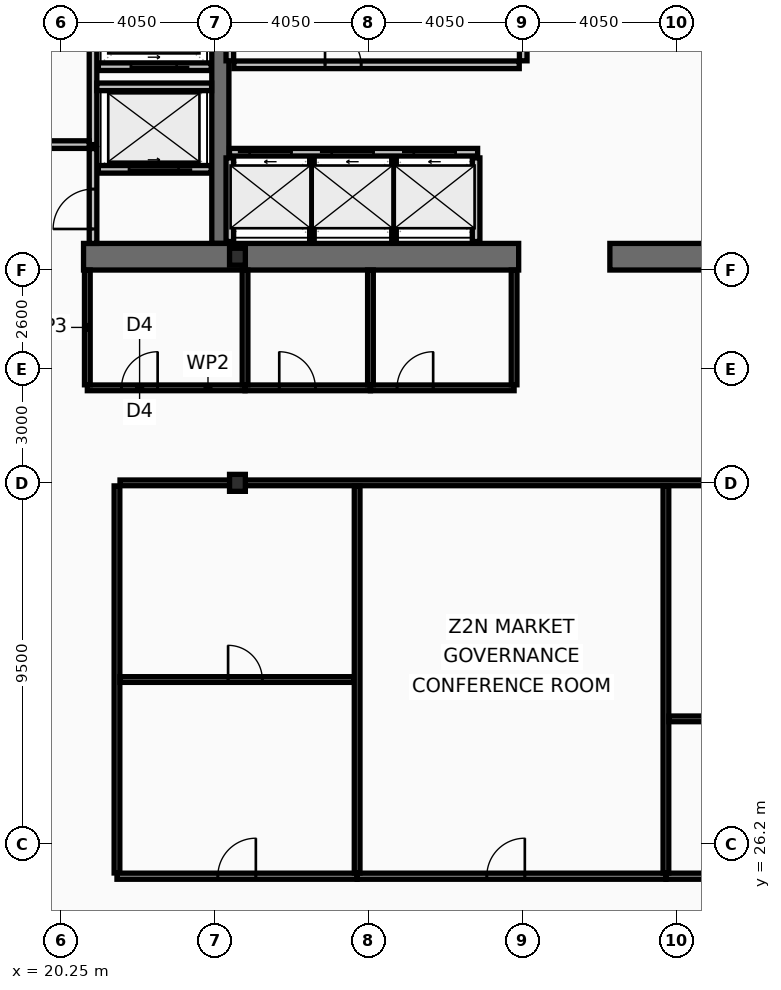
"""IFC4 building model, lengths in metres.
Left out: names, types, materials, properties, quantities, classifications, styles, units other than length and angle.
Written with IfcOpenShell. Run it as: python <this file> out.ifc"""

import sys

from ifc_helpers import new_model, si_unit, direction, frame, frame_2d, origin, origin_2d, place, context, subcontext, project, spatial, rectangle, i_section, extrude, element, fill, save


model = new_model("IFC4")
c1 = context("Model", 3, precision=1e-05, world=origin(), true_north=direction((0.0, 1.0)))
c2 = subcontext(c1, "Body", "Model", "MODEL_VIEW")
j1 = project(units=[si_unit("LENGTHUNIT", "METRE"), si_unit("PLANEANGLEUNIT", "RADIAN")], contexts=[c1])
p1 = place(None, origin())
s1 = spatial("IfcSite", under=j1, at=p1, CompositionType="ELEMENT")
p2 = place(p1, origin())
s2 = spatial("IfcBuilding", under=s1, at=p2, CompositionType="ELEMENT")
p3 = place(p2, frame((0.0, 0.0, 168.6)))
s3 = spatial("IfcBuildingStorey", under=s2, at=p3, CompositionType="ELEMENT", Elevation=168.6)
p4 = place(p3, frame((24.45, 42.0, 0.0), z_axis=(0.0, 0.0, 1.0), x_axis=(0.0, 1.0, 0.0)))
e1 = element("IfcWall", 1, at=p4, inside=s3, PredefinedType="SHEAR", context=c2, shape_type="SweptSolid", body=[
    extrude(rectangle(XDim=11.0, YDim=0.45, at=frame_2d((5.5, 0.0))), origin(), (0.0, 0.0, 1.0), 3.38),
])
p5 = place(p3, frame((32.3, 41.65, 0.0), z_axis=(0.0, 0.0, 1.0), x_axis=(-1.0, 0.0, 0.0)))
e2 = element("IfcWall", 2, at=p5, inside=s3, PredefinedType="SHEAR", context=c2, shape_type="SweptSolid", body=[
    extrude(rectangle(XDim=11.45, YDim=0.7, at=frame_2d((5.725, 0.0))), origin(), (0.0, 0.0, 1.0), 3.38),
])
p6 = place(p3, frame((38.45, 41.65, 0.0), z_axis=(0.0, 0.0, 1.0), x_axis=(-1.0, 0.0, 0.0)))
e3 = element("IfcWall", 3, at=p6, inside=s3, PredefinedType="SHEAR", context=c2, shape_type="SweptSolid", body=[
    extrude(rectangle(XDim=3.75, YDim=0.7, at=frame_2d((1.875, 0.0))), origin(), (0.0, 0.0, 1.0), 3.38),
])
for number, where, z_axis, x_axis in (
    (4, (24.9, 35.7, 0.0), (0.0, 0.0, 1.0), (1.0, 0.0, 0.0)),
    (5, (24.9, 41.65, 0.0), (0.0, 0.0, 1.0), (1.0, 0.0, 0.0)),
):
    element("IfcColumn", number, at=place(p3, frame(where, z_axis=z_axis, x_axis=x_axis)), inside=s3, PredefinedType="COLUMN", context=c2, shape_type="SweptSolid", body=[
        extrude(i_section(OverallWidth=0.416, OverallDepth=0.446, WebThickness=0.039, FlangeThickness=0.063, at=origin_2d()), origin(), (0.0, 0.0, 1.0), 3.6),
    ])
p7 = place(p3, frame((24.69, 44.4, 0.0), z_axis=(0.0, 0.0, 1.0), x_axis=(1.0, 0.0, 0.0)))
e6 = element("IfcWall", 6, at=p7, inside=s3, PredefinedType="PARTITIONING", context=c2, shape_type="SweptSolid", body=[
    extrude(rectangle(XDim=6.53, YDim=0.2, at=frame_2d((3.265, 0.0))), origin(), (0.0, 0.0, 1.0), 3.38),
])
p8 = place(p7, frame((0.53, 0.0, 0.0)))
e7 = element("IfcOpeningElement", 7, at=p8, cuts=e6, PredefinedType="OPENING", context=c2, shape_type="SweptSolid", body=[
    extrude(rectangle(XDim=1.1, YDim=2.18, at=frame_2d((0.55, 1.09))), frame((0.0, 0.11, 0.0), z_axis=(0.0, -1.0, 0.0), x_axis=(1.0, 0.0, 0.0)), (0.0, 0.0, 1.0), 0.22),
])
p9 = place(p7, frame((2.69, 0.0, 0.0)))
e8 = element("IfcOpeningElement", 8, at=p9, cuts=e6, PredefinedType="OPENING", context=c2, shape_type="SweptSolid", body=[
    extrude(rectangle(XDim=1.1, YDim=2.18, at=frame_2d((0.55, 1.09))), frame((0.0, 0.11, 0.0), z_axis=(0.0, -1.0, 0.0), x_axis=(1.0, 0.0, 0.0)), (0.0, 0.0, 1.0), 0.22),
])
p10 = place(p7, frame((4.85, 0.0, 0.0)))
e9 = element("IfcOpeningElement", 9, at=p10, cuts=e6, PredefinedType="OPENING", context=c2, shape_type="SweptSolid", body=[
    extrude(rectangle(XDim=1.1, YDim=2.18, at=frame_2d((0.55, 1.09))), frame((0.0, 0.11, 0.0), z_axis=(0.0, -1.0, 0.0), x_axis=(1.0, 0.0, 0.0)), (0.0, 0.0, 1.0), 0.22),
])
p11 = place(p3, frame((24.21, 43.95, 0.0), z_axis=(0.0, 0.0, 1.0), x_axis=(-1.0, 0.0, 0.0)))
e10 = element("IfcWall", 10, at=p11, inside=s3, PredefinedType="PARTITIONING", context=c2, shape_type="SweptSolid", body=[
    extrude(rectangle(XDim=2.97, YDim=0.2, at=frame_2d((1.485, 0.0))), origin(), (0.0, 0.0, 1.0), 3.38),
])
p12 = place(p11, frame((0.86, 0.0, 0.0)))
e11 = element("IfcOpeningElement", 11, at=p12, cuts=e10, PredefinedType="OPENING", context=c2, shape_type="SweptSolid", body=[
    extrude(rectangle(XDim=1.3, YDim=2.18, at=frame_2d((0.65, 1.09))), frame((0.0, 0.11, 0.0), z_axis=(0.0, -1.0, 0.0), x_axis=(1.0, 0.0, 0.0)), (0.0, 0.0, 1.0), 0.22),
])
p13 = place(p3, frame((24.21, 46.65, 0.0), z_axis=(0.0, 0.0, 1.0), x_axis=(-1.0, 0.0, 0.0)))
e12 = element("IfcWall", 12, at=p13, inside=s3, PredefinedType="PARTITIONING", context=c2, shape_type="SweptSolid", body=[
    extrude(rectangle(XDim=2.97, YDim=0.2, at=frame_2d((1.485, 0.0))), origin(), (0.0, 0.0, 1.0), 3.38),
])
p14 = place(p13, frame((0.91, 0.0, 0.0)))
e13 = element("IfcOpeningElement", 13, at=p14, cuts=e12, PredefinedType="OPENING", context=c2, shape_type="SweptSolid", body=[
    extrude(rectangle(XDim=1.2, YDim=2.18, at=frame_2d((0.6, 1.09))), frame((0.0, 0.11, 0.0), z_axis=(0.0, -1.0, 0.0), x_axis=(1.0, 0.0, 0.0)), (0.0, 0.0, 1.0), 0.22),
])
p15 = place(p3, frame((21.1, 44.6, 0.0), z_axis=(0.0, 0.0, 1.0), x_axis=(0.0, 1.0, 0.0)))
e14 = element("IfcWall", 14, at=p15, inside=s3, PredefinedType="PARTITIONING", context=c2, shape_type="SweptSolid", body=[
    extrude(rectangle(XDim=4.3, YDim=0.2, at=frame_2d((2.15, 0.0))), origin(), (0.0, 0.0, 1.0), 3.38),
])
p16 = place(p3, frame((16.9, 44.6, 0.0), z_axis=(0.0, 0.0, 1.0), x_axis=(1.0, 0.0, 0.0)))
e15 = element("IfcWall", 15, at=p16, inside=s3, PredefinedType="PARTITIONING", context=c2, shape_type="SweptSolid", body=[
    extrude(rectangle(XDim=4.1, YDim=0.2, at=frame_2d((2.05, 0.0))), origin(), (0.0, 0.0, 1.0), 3.38),
])
p17 = place(p16, frame((1.25, 0.0, 0.0)))
e16 = element("IfcOpeningElement", 16, at=p17, cuts=e15, PredefinedType="OPENING", context=c2, shape_type="SweptSolid", body=[
    extrude(rectangle(XDim=1.05, YDim=2.15, at=frame_2d((0.525, 1.075))), frame((0.0, 0.11, 0.0), z_axis=(0.0, -1.0, 0.0), x_axis=(1.0, 0.0, 0.0)), (0.0, 0.0, 1.0), 0.22),
])
p18 = place(p3, frame((21.2, 46.12, 0.0), z_axis=(0.0, 0.0, 1.0), x_axis=(1.0, 0.0, 0.0)))
e17 = element("IfcWall", 17, at=p18, inside=s3, PredefinedType="PARTITIONING", context=c2, shape_type="SweptSolid", body=[
    extrude(rectangle(XDim=3.02, YDim=0.2, at=frame_2d((1.51, 0.0))), origin(), (0.0, 0.0, 1.0), 3.38),
])
p19 = place(p3, frame((21.1, 42.0, 0.0), z_axis=(0.0, 0.0, 1.0), x_axis=(0.0, 1.0, 0.0)))
e18 = element("IfcWall", 18, at=p19, inside=s3, PredefinedType="PARTITIONING", context=c2, shape_type="SweptSolid", body=[
    extrude(rectangle(XDim=2.495, YDim=0.2, at=frame_2d((1.248, 0.0))), origin(), (0.0, 0.0, 1.0), 3.38),
])
p20 = place(p19, frame((0.38, 0.0, 0.0)))
e19 = element("IfcOpeningElement", 19, at=p20, cuts=e18, PredefinedType="OPENING", context=c2, shape_type="SweptSolid", body=[
    extrude(rectangle(XDim=1.05, YDim=2.15, at=frame_2d((0.525, 1.075))), frame((0.0, 0.11, 0.0), z_axis=(0.0, -1.0, 0.0), x_axis=(1.0, 0.0, 0.0)), (0.0, 0.0, 1.0), 0.22),
])
for number, where, z_axis, x_axis in (
    (20, (24.7, 46.805, 0.0), (0.0, 0.0, 1.0), (0.0, 1.0, 0.0)),
    (21, (32.42, 46.805, 0.0), (0.0, 0.0, 1.0), (0.0, 1.0, 0.0)),
):
    element("IfcWall", number, at=place(p3, frame(where, z_axis=z_axis, x_axis=x_axis)), inside=s3, PredefinedType="PARTITIONING", context=c2, shape_type="SweptSolid", body=[
        extrude(rectangle(XDim=5.99, YDim=0.2, at=frame_2d((2.995, 0.0))), origin(), (0.0, 0.0, 1.0), 3.38),
    ])
p21 = place(p3, frame((24.805, 46.7, 0.0), z_axis=(0.0, 0.0, 1.0), x_axis=(1.0, 0.0, 0.0)))
e22 = element("IfcWall", 22, at=p21, inside=s3, PredefinedType="PARTITIONING", context=c2, shape_type="SweptSolid", body=[
    extrude(rectangle(XDim=7.51, YDim=0.2, at=frame_2d((3.755, 0.0))), origin(), (0.0, 0.0, 1.0), 3.38),
])
p22 = place(p21, frame((2.4, 0.0, 0.0)))
e23 = element("IfcOpeningElement", 23, at=p22, cuts=e22, PredefinedType="OPENING", context=c2, shape_type="SweptSolid", body=[
    extrude(rectangle(XDim=0.95, YDim=2.1, at=frame_2d((0.475, 1.05))), frame((0.0, 0.11, 0.0), z_axis=(0.0, -1.0, 0.0), x_axis=(1.0, 0.0, 0.0)), (0.0, 0.0, 1.0), 0.22),
])
for number, where, z_axis, x_axis in (
    (24, (24.7, 42.05, 0.0), (0.0, 0.0, 1.0), (0.0, 1.0, 0.0)),
    (25, (31.18, 42.05, 0.0), (0.0, 0.0, 1.0), (0.0, 1.0, 0.0)),
):
    element("IfcWall", number, at=place(p3, frame(where, z_axis=z_axis, x_axis=x_axis)), inside=s3, PredefinedType="PARTITIONING", context=c2, shape_type="SweptSolid", body=[
        extrude(rectangle(XDim=2.2, YDim=0.2, at=frame_2d((1.1, 0.0))), origin(), (0.0, 0.0, 1.0), 3.38),
    ])
for number, where, z_axis, x_axis in (
    (26, (26.86, 42.05, 0.0), (0.0, 0.0, 1.0), (0.0, 1.0, 0.0)),
    (27, (29.02, 42.05, 0.0), (0.0, 0.0, 1.0), (0.0, 1.0, 0.0)),
):
    element("IfcWall", number, at=place(p3, frame(where, z_axis=z_axis, x_axis=x_axis)), inside=s3, PredefinedType="PARTITIONING", context=c2, shape_type="SweptSolid", body=[
        extrude(rectangle(XDim=2.2, YDim=0.12, at=frame_2d((1.1, 0.0))), origin(), (0.0, 0.0, 1.0), 3.38),
    ])
p23 = place(p3, frame((20.95, 38.2, 0.0), z_axis=(0.0, 0.0, 1.0), x_axis=(1.0, 0.0, 0.0)))
e28 = element("IfcWall", 28, at=p23, inside=s3, PredefinedType="PARTITIONING", context=c2, shape_type="SweptSolid", body=[
    extrude(rectangle(XDim=4.15, YDim=0.15, at=frame_2d((2.075, 0.0))), origin(), (0.0, 0.0, 1.0), 2.67),
])
p24 = place(p23, frame((0.9, 0.0, 0.0)))
e29 = element("IfcOpeningElement", 29, at=p24, cuts=e28, PredefinedType="OPENING", context=c2, shape_type="SweptSolid", body=[
    extrude(rectangle(XDim=0.95, YDim=2.05, at=frame_2d((0.475, 1.025))), frame((0.0, 0.085, 0.0), z_axis=(0.0, -1.0, 0.0), x_axis=(1.0, 0.0, 0.0)), (0.0, 0.0, 1.0), 0.17),
])
p25 = place(p3, frame((25.1, 38.2, 0.0), z_axis=(0.0, 0.0, 1.0), x_axis=(1.0, 0.0, 0.0)))
e30 = element("IfcWall", 30, at=p25, inside=s3, PredefinedType="PARTITIONING", context=c2, shape_type="SweptSolid", body=[
    extrude(rectangle(XDim=3.3, YDim=0.15, at=frame_2d((1.65, 0.0))), origin(), (0.0, 0.0, 1.0), 2.67),
])
p26 = place(p25, frame((0.9, 0.0, 0.0)))
e31 = element("IfcOpeningElement", 31, at=p26, cuts=e30, PredefinedType="OPENING", context=c2, shape_type="SweptSolid", body=[
    extrude(rectangle(XDim=0.95, YDim=2.05, at=frame_2d((0.475, 1.025))), frame((0.0, 0.085, 0.0), z_axis=(0.0, -1.0, 0.0), x_axis=(1.0, 0.0, 0.0)), (0.0, 0.0, 1.0), 0.17),
])
p27 = place(p3, frame((28.4, 38.2, 0.0), z_axis=(0.0, 0.0, 1.0), x_axis=(1.0, 0.0, 0.0)))
e32 = element("IfcWall", 32, at=p27, inside=s3, PredefinedType="PARTITIONING", context=c2, shape_type="SweptSolid", body=[
    extrude(rectangle(XDim=3.78, YDim=0.15, at=frame_2d((1.89, 0.0))), origin(), (0.0, 0.0, 1.0), 2.67),
])
p28 = place(p27, frame((0.7, 0.0, 0.0)))
e33 = element("IfcOpeningElement", 33, at=p28, cuts=e32, PredefinedType="OPENING", context=c2, shape_type="SweptSolid", body=[
    extrude(rectangle(XDim=0.95, YDim=2.05, at=frame_2d((0.475, 1.025))), frame((0.0, 0.085, 0.0), z_axis=(0.0, -1.0, 0.0), x_axis=(1.0, 0.0, 0.0)), (0.0, 0.0, 1.0), 0.17),
])
p29 = place(p3, frame((20.95, 38.28, 0.0), z_axis=(0.0, 0.0, 1.0), x_axis=(0.0, 1.0, 0.0)))
e34 = element("IfcWall", 34, at=p29, inside=s3, PredefinedType="PARTITIONING", context=c2, shape_type="SweptSolid", body=[
    extrude(rectangle(XDim=3.02, YDim=0.15, at=frame_2d((1.51, 0.0))), origin(), (0.0, 0.0, 1.0), 3.38),
])
p30 = place(p3, frame((25.1, 38.28, 0.0), z_axis=(0.0, 0.0, 1.0), x_axis=(0.0, 1.0, 0.0)))
e35 = element("IfcWall", 35, at=p30, inside=s3, PredefinedType="PARTITIONING", context=c2, shape_type="SweptSolid", body=[
    extrude(rectangle(XDim=3.02, YDim=0.15, at=frame_2d((1.51, 0.0))), origin(), (0.0, 0.0, 1.0), 2.67),
])
for number, where, z_axis, x_axis in (
    (36, (28.4, 38.28, 0.0), (0.0, 0.0, 1.0), (0.0, 1.0, 0.0)),
    (37, (32.18, 38.28, 0.0), (0.0, 0.0, 1.0), (0.0, 1.0, 0.0)),
):
    element("IfcWall", number, at=place(p3, frame(where, z_axis=z_axis, x_axis=x_axis)), inside=s3, PredefinedType="PARTITIONING", context=c2, shape_type="SweptSolid", body=[
        extrude(rectangle(XDim=3.02, YDim=0.15, at=frame_2d((1.51, 0.0))), origin(), (0.0, 0.0, 1.0), 3.38),
    ])
p31 = place(p3, frame((21.73, 25.435, 0.0), z_axis=(0.0, 0.0, 1.0), x_axis=(0.0, 1.0, 0.0)))
e38 = element("IfcWall", 38, at=p31, inside=s3, PredefinedType="PARTITIONING", context=c2, shape_type="SweptSolid", body=[
    extrude(rectangle(XDim=10.185, YDim=0.15, at=frame_2d((5.093, 0.0))), origin(), (0.0, 0.0, 1.0), 2.87),
])
p32 = place(p3, frame((21.81, 35.7, 0.0), z_axis=(0.0, 0.0, 1.0), x_axis=(1.0, 0.0, 0.0)))
e39 = element("IfcWall", 39, at=p32, inside=s3, PredefinedType="PARTITIONING", context=c2, shape_type="SweptSolid", body=[
    extrude(rectangle(XDim=44.995, YDim=0.15, at=frame_2d((22.498, 0.0))), origin(), (0.0, 0.0, 1.0), 2.67),
])
p33 = place(p3, frame((21.73, 25.35, 0.0), z_axis=(0.0, 0.0, 1.0), x_axis=(1.0, 0.0, 0.0)))
e40 = element("IfcWall", 40, at=p33, inside=s3, PredefinedType="PARTITIONING", context=c2, shape_type="SweptSolid", body=[
    extrude(rectangle(XDim=6.32, YDim=0.16, at=frame_2d((3.16, 0.0))), origin(), (0.0, 0.0, 1.0), 2.67),
])
p34 = place(p33, frame((2.654, 0.0, 0.0)))
e41 = element("IfcOpeningElement", 41, at=p34, cuts=e40, PredefinedType="OPENING", context=c2, shape_type="SweptSolid", body=[
    extrude(rectangle(XDim=1.0, YDim=2.05, at=frame_2d((0.5, 1.025))), frame((0.0, 0.09, 0.0), z_axis=(0.0, -1.0, 0.0), x_axis=(1.0, 0.0, 0.0)), (0.0, 0.0, 1.0), 0.18),
])
p35 = place(p3, frame((21.81, 30.525, 0.0), z_axis=(0.0, 0.0, 1.0), x_axis=(1.0, 0.0, 0.0)))
e42 = element("IfcWall", 42, at=p35, inside=s3, PredefinedType="PARTITIONING", context=c2, shape_type="SweptSolid", body=[
    extrude(rectangle(XDim=6.159, YDim=0.15, at=frame_2d((3.08, 0.0))), origin(), (0.0, 0.0, 1.0), 2.67),
])
p36 = place(p35, frame((2.844, 0.0, 0.0)))
e43 = element("IfcOpeningElement", 43, at=p36, cuts=e42, PredefinedType="OPENING", context=c2, shape_type="SweptSolid", body=[
    extrude(rectangle(XDim=0.9, YDim=2.05, at=frame_2d((0.45, 1.025))), frame((0.0, 0.085, 0.0), z_axis=(0.0, -1.0, 0.0), x_axis=(1.0, 0.0, 0.0)), (0.0, 0.0, 1.0), 0.17),
])
p37 = place(p3, frame((28.05, 25.35, 0.0), z_axis=(0.0, 0.0, 1.0), x_axis=(1.0, 0.0, 0.0)))
e44 = element("IfcWall", 44, at=p37, inside=s3, PredefinedType="PARTITIONING", context=c2, shape_type="SweptSolid", body=[
    extrude(rectangle(XDim=8.125, YDim=0.16, at=frame_2d((4.062, 0.0))), origin(), (0.0, 0.0, 1.0), 2.67),
])
p38 = place(p37, frame((3.413, 0.0, 0.0)))
e45 = element("IfcOpeningElement", 45, at=p38, cuts=e44, PredefinedType="OPENING", context=c2, shape_type="SweptSolid", body=[
    extrude(rectangle(XDim=1.0, YDim=2.05, at=frame_2d((0.5, 1.025))), frame((0.0, 0.09, 0.0), z_axis=(0.0, -1.0, 0.0), x_axis=(1.0, 0.0, 0.0)), (0.0, 0.0, 1.0), 0.18),
])
p39 = place(p3, frame((28.05, 25.435, 0.0), z_axis=(0.0, 0.0, 1.0), x_axis=(0.0, 1.0, 0.0)))
e46 = element("IfcWall", 46, at=p39, inside=s3, PredefinedType="PARTITIONING", context=c2, shape_type="SweptSolid", body=[
    extrude(rectangle(XDim=10.185, YDim=0.15, at=frame_2d((5.093, 0.0))), origin(), (0.0, 0.0, 1.0), 2.87),
])
p40 = place(p3, frame((36.175, 25.35, 0.0), z_axis=(0.0, 0.0, 1.0), x_axis=(1.0, 0.0, 0.0)))
e47 = element("IfcWall", 47, at=p40, inside=s3, PredefinedType="PARTITIONING", context=c2, shape_type="SweptSolid", body=[
    extrude(rectangle(XDim=7.222, YDim=0.16, at=frame_2d((3.611, 0.0))), origin(), (0.0, 0.0, 1.0), 2.67),
])
p41 = place(p40, frame((3.033, 0.0, 0.0)))
e48 = element("IfcOpeningElement", 48, at=p41, cuts=e47, PredefinedType="OPENING", context=c2, shape_type="SweptSolid", body=[
    extrude(rectangle(XDim=1.0, YDim=2.05, at=frame_2d((0.5, 1.025))), frame((0.0, 0.09, 0.0), z_axis=(0.0, -1.0, 0.0), x_axis=(1.0, 0.0, 0.0)), (0.0, 0.0, 1.0), 0.18),
])
p42 = place(p3, frame((36.175, 25.435, 0.0), z_axis=(0.0, 0.0, 1.0), x_axis=(0.0, 1.0, 0.0)))
e49 = element("IfcWall", 49, at=p42, inside=s3, PredefinedType="PARTITIONING", context=c2, shape_type="SweptSolid", body=[
    extrude(rectangle(XDim=10.185, YDim=0.15, at=frame_2d((5.093, 0.0))), origin(), (0.0, 0.0, 1.0), 2.87),
])
p43 = place(p3, frame((36.255, 29.49, 0.0), z_axis=(0.0, 0.0, 1.0), x_axis=(1.0, 0.0, 0.0)))
e50 = element("IfcWall", 50, at=p43, inside=s3, PredefinedType="PARTITIONING", context=c2, shape_type="SweptSolid", body=[
    extrude(rectangle(XDim=7.062, YDim=0.15, at=frame_2d((3.531, 0.0))), origin(), (0.0, 0.0, 1.0), 2.67),
])
p44 = place(p43, frame((3.25, 0.0, 0.0)))
e51 = element("IfcOpeningElement", 51, at=p44, cuts=e50, PredefinedType="OPENING", context=c2, shape_type="SweptSolid", body=[
    extrude(rectangle(XDim=0.9, YDim=2.05, at=frame_2d((0.45, 1.025))), frame((0.0, 0.085, 0.0), z_axis=(0.0, -1.0, 0.0), x_axis=(1.0, 0.0, 0.0)), (0.0, 0.0, 1.0), 0.17),
])
p45 = place(p8, origin())
e52 = element("IfcDoor", 52, at=p45, inside=s3, OperationType="SLIDING_TO_LEFT", PredefinedType="DOOR", context=c2, shape_type="SweptSolid", body=[
    extrude(rectangle(XDim=1.1, YDim=2.18, at=frame_2d((0.55, 1.09))), frame((0.0, 0.025, 0.0), z_axis=(0.0, -1.0, 0.0), x_axis=(1.0, 0.0, 0.0)), (0.0, 0.0, 1.0), 0.05),
])
fill(e7, e52)
p46 = place(p9, origin())
e53 = element("IfcDoor", 53, at=p46, inside=s3, OperationType="SLIDING_TO_LEFT", PredefinedType="DOOR", context=c2, shape_type="SweptSolid", body=[
    extrude(rectangle(XDim=1.1, YDim=2.18, at=frame_2d((0.55, 1.09))), frame((0.0, 0.025, 0.0), z_axis=(0.0, -1.0, 0.0), x_axis=(1.0, 0.0, 0.0)), (0.0, 0.0, 1.0), 0.05),
])
fill(e8, e53)
p47 = place(p10, origin())
e54 = element("IfcDoor", 54, at=p47, inside=s3, OperationType="SLIDING_TO_LEFT", PredefinedType="DOOR", context=c2, shape_type="SweptSolid", body=[
    extrude(rectangle(XDim=1.1, YDim=2.18, at=frame_2d((0.55, 1.09))), frame((0.0, 0.025, 0.0), z_axis=(0.0, -1.0, 0.0), x_axis=(1.0, 0.0, 0.0)), (0.0, 0.0, 1.0), 0.05),
])
fill(e9, e54)
p48 = place(p12, origin())
e55 = element("IfcDoor", 55, at=p48, inside=s3, OperationType="SLIDING_TO_LEFT", PredefinedType="DOOR", context=c2, shape_type="SweptSolid", body=[
    extrude(rectangle(XDim=1.3, YDim=2.18, at=frame_2d((0.65, 1.09))), frame((0.0, 0.025, 0.0), z_axis=(0.0, -1.0, 0.0), x_axis=(1.0, 0.0, 0.0)), (0.0, 0.0, 1.0), 0.05),
])
fill(e11, e55)
p49 = place(p14, origin())
e56 = element("IfcDoor", 56, at=p49, inside=s3, OperationType="SLIDING_TO_LEFT", PredefinedType="DOOR", context=c2, shape_type="SweptSolid", body=[
    extrude(rectangle(XDim=1.2, YDim=2.18, at=frame_2d((0.6, 1.09))), frame((0.0, 0.025, 0.0), z_axis=(0.0, -1.0, 0.0), x_axis=(1.0, 0.0, 0.0)), (0.0, 0.0, 1.0), 0.05),
])
fill(e13, e56)
p50 = place(p20, origin())
e57 = element("IfcDoor", 57, at=p50, inside=s3, OperationType="SINGLE_SWING_LEFT", PredefinedType="DOOR", context=c2, shape_type="SweptSolid", body=[
    extrude(rectangle(XDim=1.05, YDim=2.15, at=frame_2d((0.525, 1.075))), frame((0.0, 0.025, 0.0), z_axis=(0.0, -1.0, 0.0), x_axis=(1.0, 0.0, 0.0)), (0.0, 0.0, 1.0), 0.05),
])
fill(e19, e57)
p51 = place(p22, origin())
e58 = element("IfcDoor", 58, at=p51, inside=s3, OperationType="SINGLE_SWING_LEFT", PredefinedType="DOOR", context=c2, shape_type="SweptSolid", body=[
    extrude(rectangle(XDim=0.95, YDim=2.1, at=frame_2d((0.475, 1.05))), frame((0.0, 0.025, 0.0), z_axis=(0.0, -1.0, 0.0), x_axis=(1.0, 0.0, 0.0)), (0.0, 0.0, 1.0), 0.05),
])
fill(e23, e58)
p52 = place(p24, origin())
e59 = element("IfcDoor", 59, at=p52, inside=s3, OperationType="SINGLE_SWING_RIGHT", PredefinedType="DOOR", context=c2, shape_type="SweptSolid", body=[
    extrude(rectangle(XDim=0.95, YDim=2.05, at=frame_2d((0.475, 1.025))), frame((0.0, 0.025, 0.0), z_axis=(0.0, -1.0, 0.0), x_axis=(1.0, 0.0, 0.0)), (0.0, 0.0, 1.0), 0.05),
])
fill(e29, e59)
p53 = place(p26, origin())
e60 = element("IfcDoor", 60, at=p53, inside=s3, OperationType="SINGLE_SWING_LEFT", PredefinedType="DOOR", context=c2, shape_type="SweptSolid", body=[
    extrude(rectangle(XDim=0.95, YDim=2.05, at=frame_2d((0.475, 1.025))), frame((0.0, 0.025, 0.0), z_axis=(0.0, -1.0, 0.0), x_axis=(1.0, 0.0, 0.0)), (0.0, 0.0, 1.0), 0.05),
])
fill(e31, e60)
p54 = place(p28, origin())
e61 = element("IfcDoor", 61, at=p54, inside=s3, OperationType="SINGLE_SWING_RIGHT", PredefinedType="DOOR", context=c2, shape_type="SweptSolid", body=[
    extrude(rectangle(XDim=0.95, YDim=2.05, at=frame_2d((0.475, 1.025))), frame((0.0, 0.025, 0.0), z_axis=(0.0, -1.0, 0.0), x_axis=(1.0, 0.0, 0.0)), (0.0, 0.0, 1.0), 0.05),
])
fill(e33, e61)
p55 = place(p34, origin())
e62 = element("IfcDoor", 62, at=p55, inside=s3, OperationType="SINGLE_SWING_RIGHT", PredefinedType="DOOR", context=c2, shape_type="SweptSolid", body=[
    extrude(rectangle(XDim=1.0, YDim=2.05, at=frame_2d((0.5, 1.025))), frame((0.0, 0.025, 0.0), z_axis=(0.0, -1.0, 0.0), x_axis=(1.0, 0.0, 0.0)), (0.0, 0.0, 1.0), 0.05),
])
fill(e41, e62)
p56 = place(p36, origin())
e63 = element("IfcDoor", 63, at=p56, inside=s3, OperationType="SINGLE_SWING_LEFT", PredefinedType="DOOR", context=c2, shape_type="SweptSolid", body=[
    extrude(rectangle(XDim=0.9, YDim=2.05, at=frame_2d((0.45, 1.025))), frame((0.0, 0.025, 0.0), z_axis=(0.0, -1.0, 0.0), x_axis=(1.0, 0.0, 0.0)), (0.0, 0.0, 1.0), 0.05),
])
fill(e43, e63)
p57 = place(p38, origin())
e64 = element("IfcDoor", 64, at=p57, inside=s3, OperationType="SINGLE_SWING_RIGHT", PredefinedType="DOOR", context=c2, shape_type="SweptSolid", body=[
    extrude(rectangle(XDim=1.0, YDim=2.05, at=frame_2d((0.5, 1.025))), frame((0.0, 0.025, 0.0), z_axis=(0.0, -1.0, 0.0), x_axis=(1.0, 0.0, 0.0)), (0.0, 0.0, 1.0), 0.05),
])
fill(e45, e64)
save(model, sys.argv[1])
